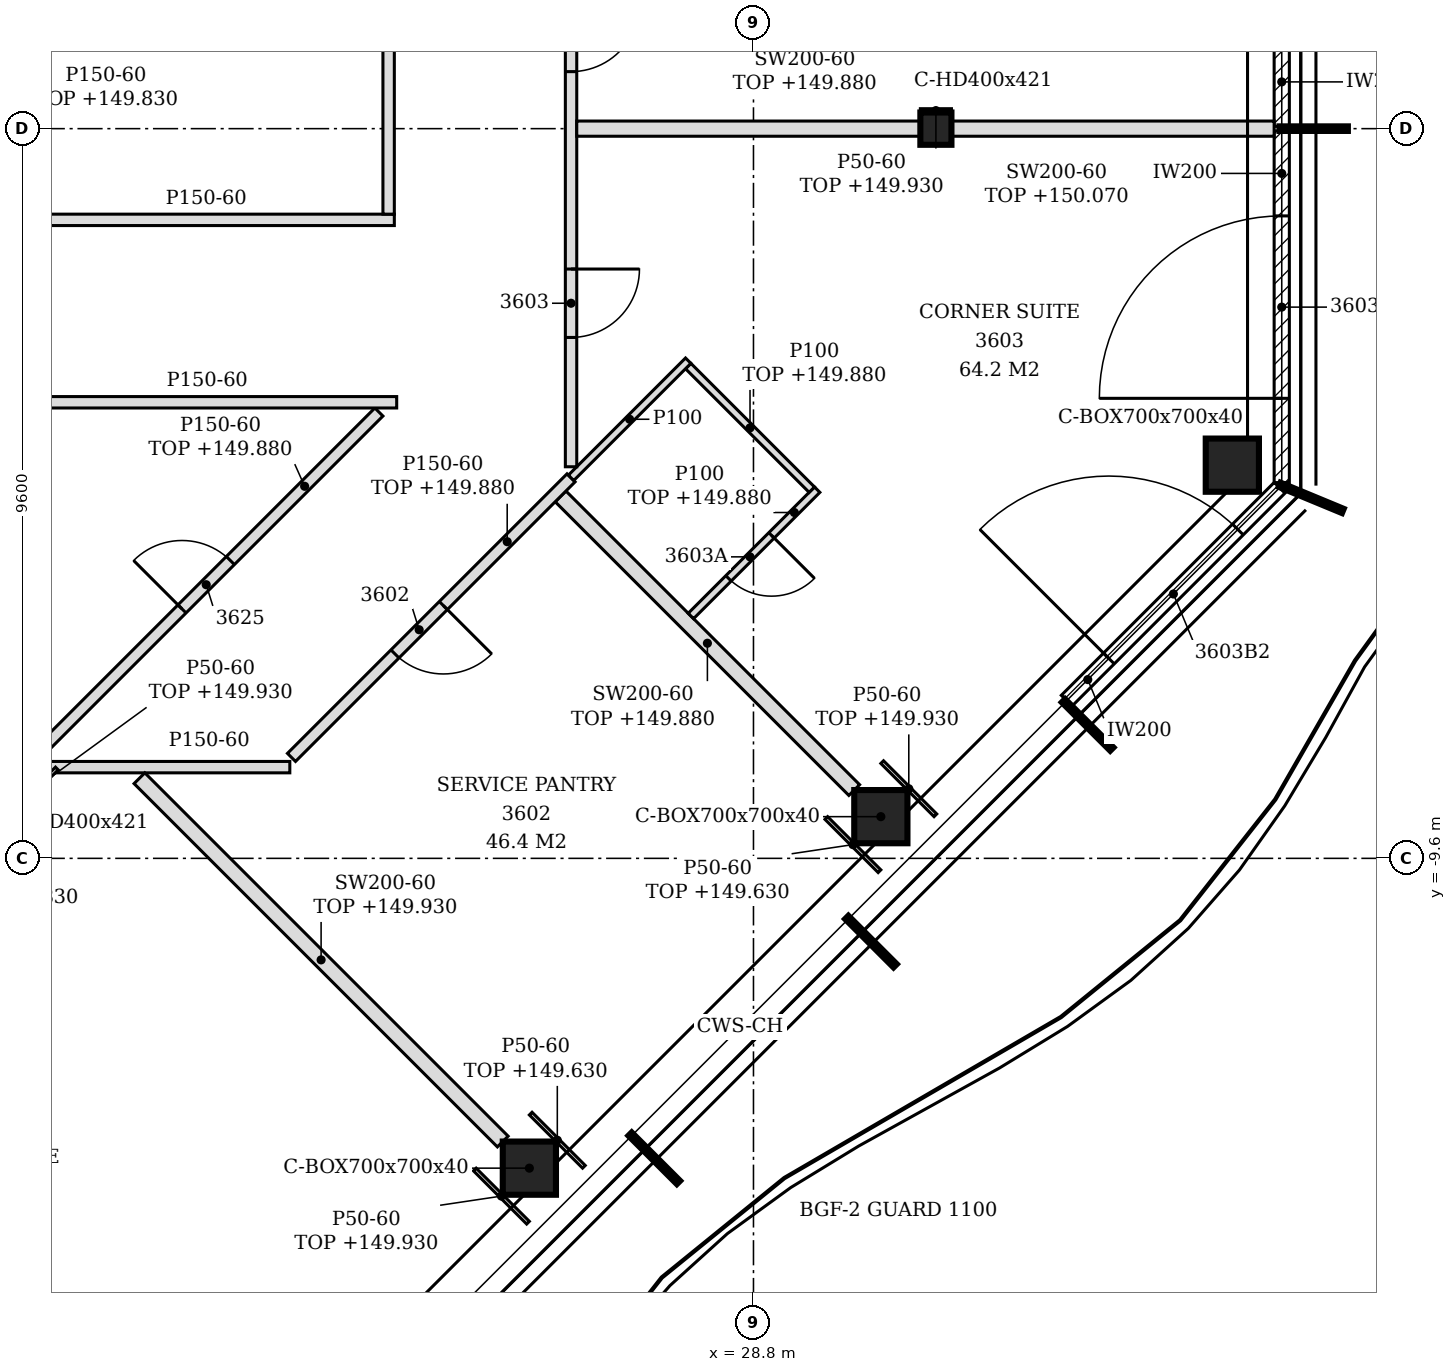
"""IFC4 building model, lengths in metres.
Left out: names, types, materials, properties, quantities, classifications, styles, units other than length and angle.
Written with IfcOpenShell. Run it as: python <this file> out.ifc"""

import sys

from ifc_helpers import new_model, si_unit, direction, frame, frame_2d, origin, origin_2d, place, context, subcontext, project, spatial, polyline, rectangle, hollow_rectangle, i_section, outline, extrude, element, fill, save


model = new_model("IFC4")
c1 = context("Model", 3, precision=1e-05, world=origin(), true_north=direction((0.0, 1.0)))
c2 = subcontext(c1, "Body", "Model", "MODEL_VIEW")
j1 = project(units=[si_unit("LENGTHUNIT", "METRE"), si_unit("PLANEANGLEUNIT", "RADIAN")], contexts=[c1])
p1 = place(None, origin())
s1 = spatial("IfcSite", under=j1, at=p1, CompositionType="ELEMENT")
p2 = place(p1, origin())
s2 = spatial("IfcBuilding", under=s1, at=p2, CompositionType="ELEMENT")
p3 = place(p2, frame((0.0, 0.0, 147.0)))
s3 = spatial("IfcBuildingStorey", under=s2, at=p3, CompositionType="ELEMENT", Elevation=147.0)
for number, where, z_axis, x_axis in (
    (1, (25.852, -13.676, -0.15), (0.0, 0.0, 1.0), (1.0, 0.0, 0.0)),
    (2, (30.476, -9.052, -0.15), (0.0, 0.0, 1.0), (1.0, 0.0, 0.0)),
    (3, (35.1, -4.427, -0.15), (0.0, 0.0, 1.0), (1.0, 0.0, 0.0)),
):
    element("IfcColumn", number, at=place(p3, frame(where, z_axis=z_axis, x_axis=x_axis)), inside=s3, PredefinedType="COLUMN", context=c2, shape_type="SweptSolid", body=[
        extrude(hollow_rectangle(XDim=0.7, YDim=0.7, WallThickness=0.04, at=origin_2d()), origin(), (0.0, 0.0, 1.0), 3.6),
    ])
p4 = place(p3, frame((31.2, 0.0, -0.15), z_axis=(0.0, 0.0, 1.0), x_axis=(1.0, 0.0, 0.0)))
e4 = element("IfcColumn", 4, at=p4, inside=s3, PredefinedType="COLUMN", context=c2, shape_type="SweptSolid", body=[
    extrude(i_section(OverallWidth=0.409, OverallDepth=0.425, WebThickness=0.033, FlangeThickness=0.052, FilletRadius=0.015, at=origin_2d()), origin(), (0.0, 0.0, 1.0), 3.6),
])
p5 = place(p3, frame((32.92, -7.526, 0.0), z_axis=(0.0, 0.0, 1.0), x_axis=(0.707106781187, 0.707106781187, 0.0)))
e5 = element("IfcWall", 5, at=p5, inside=s3, PredefinedType="NOTDEFINED", context=c2, shape_type="SweptSolid", body=[
    extrude(rectangle(XDim=3.962, YDim=0.2, at=frame_2d((1.981, 0.0))), origin(), (0.0, 0.0, 1.0), 3.45),
])
p6 = place(p5, frame((0.786, 0.0, 0.0)))
e6 = element("IfcOpeningElement", 6, at=p6, cuts=e5, PredefinedType="OPENING", context=c2, shape_type="SweptSolid", body=[
    extrude(rectangle(XDim=2.4, YDim=2.4, at=frame_2d((1.2, 1.2))), frame((0.0, 0.11, 0.0), z_axis=(0.0, -1.0, 0.0), x_axis=(1.0, 0.0, 0.0)), (0.0, 0.0, 1.0), 0.22),
])
p7 = place(p3, frame((35.75, -4.656, 0.0), z_axis=(0.0, 0.0, 1.0), x_axis=(0.0, 1.0, 0.0)))
e7 = element("IfcWall", 7, at=p7, inside=s3, PredefinedType="NOTDEFINED", context=c2, shape_type="SweptSolid", body=[
    extrude(rectangle(XDim=4.626, YDim=0.2, at=frame_2d((2.313, 0.0))), origin(), (0.0, 0.0, 1.0), 3.45),
])
p8 = place(p7, frame((1.108, 0.0, 0.0)))
e8 = element("IfcOpeningElement", 8, at=p8, cuts=e7, PredefinedType="OPENING", context=c2, shape_type="SweptSolid", body=[
    extrude(rectangle(XDim=2.4, YDim=2.4, at=frame_2d((1.2, 1.2))), frame((0.0, 0.11, 0.0), z_axis=(0.0, -1.0, 0.0), x_axis=(1.0, 0.0, 0.0)), (0.0, 0.0, 1.0), 0.22),
])
p9 = place(p3, frame((35.75, 0.03, 0.0), z_axis=(0.0, 0.0, 1.0), x_axis=(0.0, 1.0, 0.0)))
e9 = element("IfcWall", 9, at=p9, inside=s3, PredefinedType="NOTDEFINED", context=c2, shape_type="SweptSolid", body=[
    extrude(rectangle(XDim=4.74, YDim=0.2, at=frame_2d((2.37, 0.0))), origin(), (0.0, 0.0, 1.0), 3.45),
])
p10 = place(p9, frame((1.17, 0.0, 0.0)))
e10 = element("IfcOpeningElement", 10, at=p10, cuts=e9, PredefinedType="OPENING", context=c2, shape_type="SweptSolid", body=[
    extrude(rectangle(XDim=2.4, YDim=2.4, at=frame_2d((1.2, 1.2))), frame((0.0, 0.11, 0.0), z_axis=(0.0, -1.0, 0.0), x_axis=(1.0, 0.0, 0.0)), (0.0, 0.0, 1.0), 0.22),
])
p11 = place(p3, frame((25.502, -13.326, 0.0), z_axis=(0.0, 0.0, 1.0), x_axis=(-0.707106781187, 0.707106781187, 0.0)))
e11 = element("IfcWall", 11, at=p11, inside=s3, PredefinedType="PARTITIONING", context=c2, shape_type="SweptSolid", body=[
    extrude(rectangle(XDim=6.76, YDim=0.2, at=frame_2d((3.38, 0.0))), origin(), (0.0, 0.0, 1.0), 2.93),
])
p12 = place(p3, frame((30.125, -8.702, 0.0), z_axis=(0.0, 0.0, 1.0), x_axis=(-0.707084440093, 0.707129121574, 0.0)))
e12 = element("IfcWall", 12, at=p12, inside=s3, PredefinedType="PARTITIONING", context=c2, shape_type="SweptSolid", body=[
    extrude(rectangle(XDim=5.464, YDim=0.2, at=frame_2d((2.732, 0.0))), origin(), (0.0, 0.0, 1.0), 2.88),
])
p13 = place(p3, frame((19.405, -8.4, 0.0), z_axis=(0.0, 0.0, 1.0), x_axis=(1.0, 0.0, 0.0)))
e13 = element("IfcWall", 13, at=p13, inside=s3, PredefinedType="PARTITIONING", context=c2, shape_type="SweptSolid", body=[
    extrude(rectangle(XDim=3.295, YDim=0.15, at=frame_2d((1.648, 0.0))), origin(), (0.0, 0.0, 1.0), 3.45),
])
p14 = place(p3, frame((22.722, -8.272, 0.0), z_axis=(0.0, 0.0, 1.0), x_axis=(0.707106781187, 0.707106781187, 0.0)))
e14 = element("IfcWall", 14, at=p14, inside=s3, PredefinedType="PARTITIONING", context=c2, shape_type="SweptSolid", body=[
    extrude(rectangle(XDim=5.201, YDim=0.15, at=frame_2d((2.601, 0.0))), origin(), (0.0, 0.0, 1.0), 2.88),
])
p15 = place(p14, frame((1.925, 0.0, 0.0)))
e15 = element("IfcOpeningElement", 15, at=p15, cuts=e14, PredefinedType="OPENING", context=c2, shape_type="SweptSolid", body=[
    extrude(rectangle(XDim=0.9, YDim=2.1, at=frame_2d((0.45, 1.05))), frame((0.0, 0.085, 0.0), z_axis=(0.0, -1.0, 0.0), x_axis=(1.0, 0.0, 0.0)), (0.0, 0.0, 1.0), 0.17),
])
p16 = place(p3, frame((19.408, -8.191, 0.0), z_axis=(0.0, 0.0, 1.0), x_axis=(0.707126119272, 0.707087442572, 0.0)))
e16 = element("IfcWall", 16, at=p16, inside=s3, PredefinedType="PARTITIONING", context=c2, shape_type="SweptSolid", body=[
    extrude(rectangle(XDim=6.312, YDim=0.15, at=frame_2d((3.156, 0.0))), origin(), (0.0, 0.0, 1.0), 2.88),
])
p17 = place(p16, frame((2.649, 0.0, 0.0)))
e17 = element("IfcOpeningElement", 17, at=p17, cuts=e16, PredefinedType="OPENING", context=c2, shape_type="SweptSolid", body=[
    extrude(rectangle(XDim=0.9, YDim=2.1, at=frame_2d((0.45, 1.05))), frame((0.0, 0.085, 0.0), z_axis=(0.0, -1.0, 0.0), x_axis=(1.0, 0.0, 0.0)), (0.0, 0.0, 1.0), 0.17),
])
p18 = place(p3, frame((27.977, -6.411, 0.0), z_axis=(0.0, 0.0, 1.0), x_axis=(0.707054828152, 0.707158730404, 0.0)))
e18 = element("IfcWall", 18, at=p18, inside=s3, PredefinedType="PARTITIONING", context=c2, shape_type="SweptSolid", body=[
    extrude(rectangle(XDim=2.35, YDim=0.1, at=frame_2d((1.175, 0.0))), origin(), (0.0, 0.0, 1.0), 2.88),
])
p19 = place(p18, frame((0.7, 0.0, 0.0)))
e19 = element("IfcOpeningElement", 19, at=p19, cuts=e18, PredefinedType="OPENING", context=c2, shape_type="SweptSolid", body=[
    extrude(rectangle(XDim=0.8, YDim=2.1, at=frame_2d((0.4, 1.05))), frame((0.0, 0.06, 0.0), z_axis=(0.0, -1.0, 0.0), x_axis=(1.0, 0.0, 0.0)), (0.0, 0.0, 1.0), 0.12),
])
p20 = place(p3, frame((29.568, -4.75, 0.0), z_axis=(0.0, 0.0, 1.0), x_axis=(-0.707106781187, 0.707106781187, 0.0)))
e20 = element("IfcWall", 20, at=p20, inside=s3, PredefinedType="PARTITIONING", context=c2, shape_type="SweptSolid", body=[
    extrude(rectangle(XDim=2.3, YDim=0.1, at=frame_2d((1.15, 0.0))), origin(), (0.0, 0.0, 1.0), 2.88),
])
p21 = place(p3, frame((26.4, -4.594, 0.0), z_axis=(0.0, 0.0, 1.0), x_axis=(0.707106781187, 0.707106781187, 0.0)))
e21 = element("IfcWall", 21, at=p21, inside=s3, PredefinedType="PARTITIONING", context=c2, shape_type="SweptSolid", body=[
    extrude(rectangle(XDim=2.18, YDim=0.1, at=frame_2d((1.09, 0.0))), origin(), (0.0, 0.0, 1.0), 3.45),
])
p22 = place(p3, frame((26.4, -4.448, 0.0), z_axis=(0.0, 0.0, 1.0), x_axis=(0.0, 1.0, 0.0)))
e22 = element("IfcWall", 22, at=p22, inside=s3, PredefinedType="PARTITIONING", context=c2, shape_type="SweptSolid", body=[
    extrude(outline(polyline([(0.0, 0.0), (13.948, 0.0), (13.948, 2.88), (13.943, 2.88), (13.941, 3.45), (9.353, 3.45), (9.351, 2.88), (9.143, 2.88), (9.141, 3.45), (4.553, 3.45), (4.551, 2.88), (4.343, 2.88), (4.341, 3.45), (0.0, 3.45), (0.0, 0.0)])), frame((0.0, 0.075, 0.0), z_axis=(0.0, -1.0, 0.0), x_axis=(1.0, 0.0, 0.0)), (0.0, 0.0, 1.0), 0.15),
])
p23 = place(p22, frame((1.701, 0.0, 0.0)))
e23 = element("IfcOpeningElement", 23, at=p23, cuts=e22, PredefinedType="OPENING", context=c2, shape_type="SweptSolid", body=[
    extrude(rectangle(XDim=0.9, YDim=2.1, at=frame_2d((0.45, 1.05))), frame((0.0, 0.085, 0.0), z_axis=(0.0, -1.0, 0.0), x_axis=(1.0, 0.0, 0.0)), (0.0, 0.0, 1.0), 0.17),
])
p24 = place(p22, frame((5.198, 0.0, 0.0)))
e24 = element("IfcOpeningElement", 24, at=p24, cuts=e22, PredefinedType="OPENING", context=c2, shape_type="SweptSolid", body=[
    extrude(rectangle(XDim=0.9, YDim=2.1, at=frame_2d((0.45, 1.05))), frame((0.0, 0.085, 0.0), z_axis=(0.0, -1.0, 0.0), x_axis=(1.0, 0.0, 0.0)), (0.0, 0.0, 1.0), 0.17),
])
p25 = place(p22, frame((11.095, 0.0, 0.0)))
e25 = element("IfcOpeningElement", 25, at=p25, cuts=e22, PredefinedType="OPENING", context=c2, shape_type="SweptSolid", body=[
    extrude(rectangle(XDim=0.9, YDim=2.1, at=frame_2d((0.45, 1.05))), frame((0.0, 0.085, 0.0), z_axis=(0.0, -1.0, 0.0), x_axis=(1.0, 0.0, 0.0)), (0.0, 0.0, 1.0), 0.17),
])
p26 = place(p3, frame((19.125, -3.6, 0.0), z_axis=(0.0, 0.0, 1.0), x_axis=(1.0, 0.0, 0.0)))
e26 = element("IfcWall", 26, at=p26, inside=s3, PredefinedType="PARTITIONING", context=c2, shape_type="SweptSolid", body=[
    extrude(outline(polyline([(0.0, 0.0), (4.981, 0.0), (4.981, 3.45), (0.225, 3.45), (0.223, 2.83), (0.0, 2.83), (0.0, 0.0)])), frame((0.0, 0.075, 0.0), z_axis=(0.0, -1.0, 0.0), x_axis=(1.0, 0.0, 0.0)), (0.0, 0.0, 1.0), 0.15),
])
p27 = place(p3, frame((19.125, -1.2, 0.0), z_axis=(0.0, 0.0, 1.0), x_axis=(1.0, 0.0, 0.0)))
e27 = element("IfcWall", 27, at=p27, inside=s3, PredefinedType="PARTITIONING", context=c2, shape_type="SweptSolid", body=[
    extrude(outline(polyline([(0.0, 0.0), (4.95, 0.0), (4.95, 3.45), (0.225, 3.45), (0.223, 2.83), (0.0, 2.83), (0.0, 0.0)])), frame((0.0, 0.075, 0.0), z_axis=(0.0, -1.0, 0.0), x_axis=(1.0, 0.0, 0.0)), (0.0, 0.0, 1.0), 0.15),
])
p28 = place(p3, frame((24.0, -1.125, 0.0), z_axis=(0.0, 0.0, 1.0), x_axis=(0.0, 1.0, 0.0)))
e28 = element("IfcWall", 28, at=p28, inside=s3, PredefinedType="PARTITIONING", context=c2, shape_type="SweptSolid", body=[
    extrude(outline(polyline([(0.0, 0.0), (9.631, 0.0), (9.631, 3.45), (6.03, 3.45), (6.028, 2.88), (5.82, 2.88), (5.818, 3.45), (1.23, 3.45), (1.228, 2.88), (1.02, 2.88), (1.018, 3.45), (0.0, 3.45), (0.0, 0.0)])), frame((0.0, 0.075, 0.0), z_axis=(0.0, -1.0, 0.0), x_axis=(1.0, 0.0, 0.0)), (0.0, 0.0, 1.0), 0.15),
])
p29 = place(p3, frame((26.475, 0.0, 0.0), z_axis=(0.0, 0.0, 1.0), x_axis=(1.0, 0.0, 0.0)))
e29 = element("IfcWall", 29, at=p29, inside=s3, PredefinedType="PARTITIONING", context=c2, shape_type="SweptSolid", body=[
    extrude(rectangle(XDim=4.521, YDim=0.2, at=frame_2d((2.26, 0.0))), origin(), (0.0, 0.0, 1.0), 2.88),
])
p30 = place(p3, frame((31.405, 0.0, 0.0), z_axis=(0.0, 0.0, 1.0), x_axis=(1.0, 0.0, 0.0)))
e30 = element("IfcWall", 30, at=p30, inside=s3, PredefinedType="PARTITIONING", context=c2, shape_type="SweptSolid", body=[
    extrude(outline(polyline([(0.0, 0.0), (4.245, 0.0), (4.246, 3.07), (3.845, 3.07), (3.844, 2.93), (3.545, 2.93), (3.543, 3.07), (0.0, 3.07), (0.0, 0.0)])), frame((0.0, 0.1, 0.0), z_axis=(0.0, -1.0, 0.0), x_axis=(1.0, 0.0, 0.0)), (0.0, 0.0, 1.0), 0.2),
])
p31 = place(p3, frame((25.834, -14.393, 0.0), z_axis=(0.0, 0.0, 1.0), x_axis=(-0.707106781187, 0.707106781187, 0.0)))
e31 = element("IfcWall", 31, at=p31, inside=s3, PredefinedType="PARTITIONING", context=c2, shape_type="SweptSolid", body=[
    extrude(rectangle(XDim=0.99, YDim=0.05, at=frame_2d((0.495, 0.0))), origin(), (0.0, 0.0, 1.0), 2.93),
])
for number, where, z_axis, x_axis in (
    (32, (26.569, -13.658, 0.0), (0.0, 0.0, 1.0), (-0.707, 0.707, 0.0)),
    (33, (30.458, -9.769, 0.0), (0.0, 0.0, 1.0), (-0.707, 0.707, 0.0)),
):
    element("IfcWall", number, at=place(p3, frame(where, z_axis=z_axis, x_axis=x_axis)), inside=s3, PredefinedType="PARTITIONING", context=c2, shape_type="SweptSolid", body=[
        extrude(rectangle(XDim=0.99, YDim=0.05, at=frame_2d((0.495, 0.0))), origin(), (0.0, 0.0, 1.0), 2.63),
    ])
p32 = place(p3, frame((31.193, -9.034, 0.0), z_axis=(0.0, 0.0, 1.0), x_axis=(-0.707106781187, 0.707106781187, 0.0)))
e34 = element("IfcWall", 34, at=p32, inside=s3, PredefinedType="PARTITIONING", context=c2, shape_type="SweptSolid", body=[
    extrude(rectangle(XDim=0.99, YDim=0.05, at=frame_2d((0.495, 0.0))), origin(), (0.0, 0.0, 1.0), 2.93),
])
p33 = place(p3, frame((19.218, -8.835, 0.0), z_axis=(0.0, 0.0, 1.0), x_axis=(0.707106781187, 0.707106781187, 0.0)))
e35 = element("IfcWall", 35, at=p33, inside=s3, PredefinedType="PARTITIONING", context=c2, shape_type="SweptSolid", body=[
    extrude(rectangle(XDim=0.59, YDim=0.05, at=frame_2d((0.295, 0.0))), origin(), (0.0, 0.0, 1.0), 2.93),
])
p34 = place(p3, frame((30.996, 0.238, 0.0), z_axis=(0.0, 0.0, 1.0), x_axis=(1.0, 0.0, 0.0)))
e36 = element("IfcWall", 36, at=p34, inside=s3, PredefinedType="PARTITIONING", context=c2, shape_type="SweptSolid", body=[
    extrude(rectangle(XDim=0.409, YDim=0.05, at=frame_2d((0.205, 0.0))), origin(), (0.0, 0.0, 1.0), 2.93),
])
p35 = place(p6, origin())
e37 = element("IfcDoor", 37, at=p35, inside=s3, OperationType="SINGLE_SWING_LEFT", PredefinedType="DOOR", context=c2, shape_type="SweptSolid", body=[
    extrude(rectangle(XDim=2.4, YDim=2.4, at=frame_2d((1.2, 1.2))), frame((0.0, 0.025, 0.0), z_axis=(0.0, -1.0, 0.0), x_axis=(1.0, 0.0, 0.0)), (0.0, 0.0, 1.0), 0.05),
])
fill(e6, e37)
p36 = place(p8, origin())
e38 = element("IfcDoor", 38, at=p36, inside=s3, OperationType="SINGLE_SWING_LEFT", PredefinedType="DOOR", context=c2, shape_type="SweptSolid", body=[
    extrude(rectangle(XDim=2.4, YDim=2.4, at=frame_2d((1.2, 1.2))), frame((0.0, 0.025, 0.0), z_axis=(0.0, -1.0, 0.0), x_axis=(1.0, 0.0, 0.0)), (0.0, 0.0, 1.0), 0.05),
])
fill(e8, e38)
p37 = place(p15, frame((0.9, 0.0, 0.0), z_axis=(0.0, 0.0, 1.0), x_axis=(-1.0, 0.0, 0.0)))
e39 = element("IfcDoor", 39, at=p37, inside=s3, OperationType="SINGLE_SWING_LEFT", PredefinedType="DOOR", context=c2, shape_type="SweptSolid", body=[
    extrude(rectangle(XDim=0.9, YDim=2.1, at=frame_2d((0.45, 1.05))), frame((0.0, 0.025, 0.0), z_axis=(0.0, -1.0, 0.0), x_axis=(1.0, 0.0, 0.0)), (0.0, 0.0, 1.0), 0.05),
])
fill(e15, e39)
p38 = place(p23, frame((0.9, 0.0, 0.0), z_axis=(0.0, 0.0, 1.0), x_axis=(-1.0, 0.0, 0.0)))
e40 = element("IfcDoor", 40, at=p38, inside=s3, OperationType="SINGLE_SWING_LEFT", PredefinedType="DOOR", context=c2, shape_type="SweptSolid", body=[
    extrude(rectangle(XDim=0.9, YDim=2.1, at=frame_2d((0.45, 1.05))), frame((0.0, 0.025, 0.0), z_axis=(0.0, -1.0, 0.0), x_axis=(1.0, 0.0, 0.0)), (0.0, 0.0, 1.0), 0.05),
])
fill(e23, e40)
p39 = place(p19, frame((0.8, 0.0, 0.0), z_axis=(0.0, 0.0, 1.0), x_axis=(-1.0, 0.0, 0.0)))
e41 = element("IfcDoor", 41, at=p39, inside=s3, OperationType="SINGLE_SWING_LEFT", PredefinedType="DOOR", context=c2, shape_type="SweptSolid", body=[
    extrude(rectangle(XDim=0.8, YDim=2.1, at=frame_2d((0.4, 1.05))), frame((0.0, 0.025, 0.0), z_axis=(0.0, -1.0, 0.0), x_axis=(1.0, 0.0, 0.0)), (0.0, 0.0, 1.0), 0.05),
])
fill(e19, e41)
p40 = place(p24, frame((0.9, 0.0, 0.0), z_axis=(0.0, 0.0, 1.0), x_axis=(-1.0, 0.0, 0.0)))
e42 = element("IfcDoor", 42, at=p40, inside=s3, OperationType="SINGLE_SWING_LEFT", PredefinedType="DOOR", context=c2, shape_type="SweptSolid", body=[
    extrude(rectangle(XDim=0.9, YDim=2.1, at=frame_2d((0.45, 1.05))), frame((0.0, 0.025, 0.0), z_axis=(0.0, -1.0, 0.0), x_axis=(1.0, 0.0, 0.0)), (0.0, 0.0, 1.0), 0.05),
])
fill(e24, e42)
p41 = place(p17, origin())
e43 = element("IfcDoor", 43, at=p41, inside=s3, OperationType="SINGLE_SWING_LEFT", PredefinedType="DOOR", context=c2, shape_type="SweptSolid", body=[
    extrude(rectangle(XDim=0.9, YDim=2.1, at=frame_2d((0.45, 1.05))), frame((0.0, 0.025, 0.0), z_axis=(0.0, -1.0, 0.0), x_axis=(1.0, 0.0, 0.0)), (0.0, 0.0, 1.0), 0.05),
])
fill(e17, e43)
save(model, sys.argv[1])
